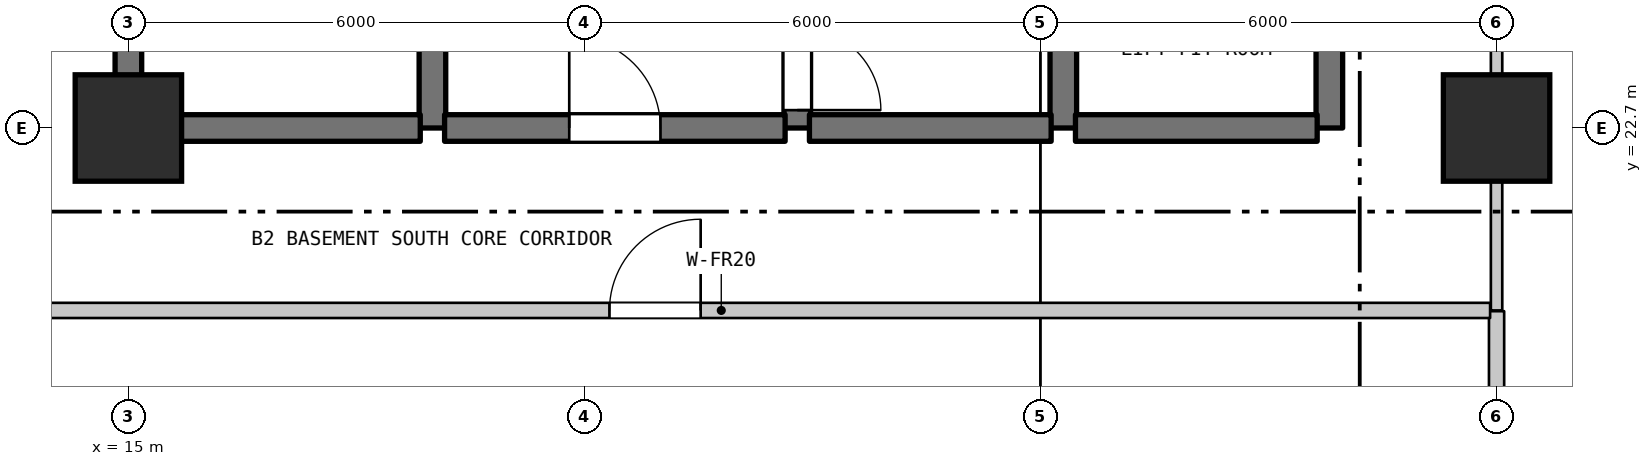
"""IFC4 building model, lengths in metres.
Left out: names, types, materials, properties, quantities, classifications, styles, units other than length and angle.
Written with IfcOpenShell. Run it as: python <this file> out.ifc"""

import sys

from ifc_helpers import new_model, si_unit, direction, frame, frame_2d, origin, origin_2d, place, context, subcontext, project, spatial, rectangle, extrude, element, fill, save


model = new_model("IFC4")
c1 = context("Model", 3, precision=1e-05, world=origin(), true_north=direction((0.0, 1.0)))
c2 = subcontext(c1, "Body", "Model", "MODEL_VIEW")
j1 = project(units=[si_unit("LENGTHUNIT", "METRE"), si_unit("PLANEANGLEUNIT", "RADIAN")], contexts=[c1])
p1 = place(None, origin())
s1 = spatial("IfcSite", under=j1, at=p1, CompositionType="ELEMENT")
p2 = place(p1, origin())
s2 = spatial("IfcBuilding", under=s1, at=p2, CompositionType="ELEMENT")
p3 = place(p2, frame((0.0, 0.0, -9.0)))
s3 = spatial("IfcBuildingStorey", under=s2, at=p3, CompositionType="ELEMENT", Elevation=-9.0)
p4 = place(p3, frame((15.0, 22.7, 0.0), z_axis=(0.0, 0.0, 1.0), x_axis=(1.0, 0.0, 0.0)))
e1 = element("IfcColumn", 1, at=p4, inside=s3, PredefinedType="COLUMN", context=c2, shape_type="SweptSolid", body=[
    extrude(rectangle(XDim=1.4, YDim=1.4, at=origin_2d()), origin(), (0.0, 0.0, 1.0), 4.5),
])
p5 = place(p3, frame((33.0, 22.7, 0.0), z_axis=(0.0, 0.0, 1.0), x_axis=(1.0, 0.0, 0.0)))
e2 = element("IfcColumn", 2, at=p5, inside=s3, PredefinedType="PILASTER", context=c2, shape_type="SweptSolid", body=[
    extrude(rectangle(XDim=1.4, YDim=1.4, at=origin_2d()), origin(), (0.0, 0.0, 1.0), 4.5),
])
p6 = place(p3, frame((15.0, 22.7, 0.0), z_axis=(0.0, 0.0, 1.0), x_axis=(0.0, 1.0, 0.0)))
e3 = element("IfcWall", 3, at=p6, inside=s3, PredefinedType="SHEAR", context=c2, shape_type="SweptSolid", body=[
    extrude(rectangle(XDim=6.8, YDim=0.35, at=frame_2d((3.4, 0.0))), origin(), (0.0, 0.0, 1.0), 4.16),
])
p7 = place(p3, frame((19.0, 22.7, 0.0), z_axis=(0.0, 0.0, 1.0), x_axis=(0.0, 1.0, 0.0)))
e4 = element("IfcWall", 4, at=p7, inside=s3, PredefinedType="SHEAR", context=c2, shape_type="SweptSolid", body=[
    extrude(rectangle(XDim=5.5, YDim=0.35, at=frame_2d((2.75, 0.0))), origin(), (0.0, 0.0, 1.0), 4.16),
])
p8 = place(p7, frame((2.2, 0.0, 0.0)))
e5 = element("IfcOpeningElement", 5, at=p8, cuts=e4, PredefinedType="OPENING", context=c2, shape_type="SweptSolid", body=[
    extrude(rectangle(XDim=1.1, YDim=2.15, at=frame_2d((0.55, 1.075))), frame((0.0, 0.185, 0.0), z_axis=(0.0, -1.0, 0.0), x_axis=(1.0, 0.0, 0.0)), (0.0, 0.0, 1.0), 0.37),
])
p9 = place(p3, frame((23.8, 22.7, 0.0), z_axis=(0.0, 0.0, 1.0), x_axis=(0.0, 1.0, 0.0)))
e6 = element("IfcWall", 6, at=p9, inside=s3, PredefinedType="SHEAR", context=c2, shape_type="SweptSolid", body=[
    extrude(rectangle(XDim=5.5, YDim=0.35, at=frame_2d((2.75, 0.0))), origin(), (0.0, 0.0, 1.0), 4.16),
])
p10 = place(p9, frame((0.235, 0.0, 0.0)))
e7 = element("IfcOpeningElement", 7, at=p10, cuts=e6, PredefinedType="OPENING", context=c2, shape_type="SweptSolid", body=[
    extrude(rectangle(XDim=1.1, YDim=2.15, at=frame_2d((0.55, 1.075))), frame((0.0, 0.185, 0.0), z_axis=(0.0, -1.0, 0.0), x_axis=(1.0, 0.0, 0.0)), (0.0, 0.0, 1.0), 0.37),
])
for number, where, z_axis, x_axis in (
    (8, (27.3, 22.7, 0.0), (0.0, 0.0, 1.0), (0.0, 1.0, 0.0)),
    (9, (30.8, 22.7, 0.0), (0.0, 0.0, 1.0), (0.0, 1.0, 0.0)),
):
    element("IfcWall", number, at=place(p3, frame(where, z_axis=z_axis, x_axis=x_axis)), inside=s3, PredefinedType="SHEAR", context=c2, shape_type="SweptSolid", body=[
        extrude(rectangle(XDim=2.9, YDim=0.35, at=frame_2d((1.45, 0.0))), origin(), (0.0, 0.0, 1.0), 4.16),
    ])
p11 = place(p3, frame((33.0, 0.71, 0.0), z_axis=(0.0, 0.0, 1.0), x_axis=(0.0, 1.0, 0.0)))
e10 = element("IfcWall", 10, at=p11, inside=s3, PredefinedType="STANDARD", context=c2, shape_type="SweptSolid", body=[
    extrude(rectangle(XDim=19.58, YDim=0.2, at=frame_2d((9.79, 0.0))), origin(), (0.0, 0.0, 1.0), 3.61),
])
p12 = place(p3, frame((33.0, 20.3, 0.0), z_axis=(0.0, 0.0, 1.0), x_axis=(0.0, 1.0, 0.0)))
e11 = element("IfcWall", 11, at=p12, inside=s3, PredefinedType="STANDARD", context=c2, shape_type="SweptSolid", body=[
    extrude(rectangle(XDim=2.4, YDim=0.15, at=frame_2d((1.2, 0.0))), origin(), (0.0, 0.0, 1.0), 3.61),
])
p13 = place(p3, frame((12.685, 20.3, 0.0), z_axis=(0.0, 0.0, 1.0), x_axis=(1.0, 0.0, 0.0)))
e12 = element("IfcWall", 12, at=p13, inside=s3, PredefinedType="STANDARD", context=c2, shape_type="SweptSolid", body=[
    extrude(rectangle(XDim=20.23, YDim=0.2, at=frame_2d((10.115, 0.0))), origin(), (0.0, 0.0, 1.0), 4.16),
])
p14 = place(p13, frame((8.644, 0.0, 0.0)))
e13 = element("IfcOpeningElement", 13, at=p14, cuts=e12, PredefinedType="OPENING", context=c2, shape_type="SweptSolid", body=[
    extrude(rectangle(XDim=1.2, YDim=2.2, at=frame_2d((0.6, 1.1))), frame((0.0, 0.11, 0.0), z_axis=(0.0, -1.0, 0.0), x_axis=(1.0, 0.0, 0.0)), (0.0, 0.0, 1.0), 0.22),
])
p15 = place(p3, frame((15.16, 22.7, 0.0), z_axis=(0.0, 0.0, 1.0), x_axis=(1.0, 0.0, 0.0)))
e14 = element("IfcWall", 14, at=p15, inside=s3, PredefinedType="SHEAR", context=c2, shape_type="SweptSolid", body=[
    extrude(rectangle(XDim=3.68, YDim=0.35, at=frame_2d((1.84, 0.0))), origin(), (0.0, 0.0, 1.0), 4.16),
])
p16 = place(p3, frame((19.16, 22.7, 0.0), z_axis=(0.0, 0.0, 1.0), x_axis=(1.0, 0.0, 0.0)))
e15 = element("IfcWall", 15, at=p16, inside=s3, PredefinedType="SHEAR", context=c2, shape_type="SweptSolid", body=[
    extrude(rectangle(XDim=4.48, YDim=0.35, at=frame_2d((2.24, 0.0))), origin(), (0.0, 0.0, 1.0), 4.16),
])
p17 = place(p16, frame((1.64, 0.0, 0.0)))
e16 = element("IfcOpeningElement", 16, at=p17, cuts=e15, PredefinedType="OPENING", context=c2, shape_type="SweptSolid", body=[
    extrude(rectangle(XDim=1.2, YDim=2.2, at=frame_2d((0.6, 1.1))), frame((0.0, 0.185, 0.0), z_axis=(0.0, -1.0, 0.0), x_axis=(1.0, 0.0, 0.0)), (0.0, 0.0, 1.0), 0.37),
])
for number, where, z_axis, x_axis in (
    (17, (23.96, 22.7, 0.0), (0.0, 0.0, 1.0), (1.0, 0.0, 0.0)),
    (18, (27.46, 22.7, 0.0), (0.0, 0.0, 1.0), (1.0, 0.0, 0.0)),
):
    element("IfcWall", number, at=place(p3, frame(where, z_axis=z_axis, x_axis=x_axis)), inside=s3, PredefinedType="SHEAR", context=c2, shape_type="SweptSolid", body=[
        extrude(rectangle(XDim=3.18, YDim=0.35, at=frame_2d((1.59, 0.0))), origin(), (0.0, 0.0, 1.0), 4.16),
    ])
p18 = place(p3, frame((33.0, 22.7, 0.0), z_axis=(0.0, 0.0, 1.0), x_axis=(0.0, 1.0, 0.0)))
e19 = element("IfcWall", 19, at=p18, inside=s3, PredefinedType="STANDARD", context=c2, shape_type="SweptSolid", body=[
    extrude(rectangle(XDim=15.2, YDim=0.15, at=frame_2d((7.6, 0.0))), origin(), (0.0, 0.0, 1.0), 3.56),
])
p19 = place(p18, frame((7.575, 0.0, 0.0)))
e20 = element("IfcOpeningElement", 20, at=p19, cuts=e19, PredefinedType="OPENING", context=c2, shape_type="SweptSolid", body=[
    extrude(rectangle(XDim=1.2, YDim=2.2, at=frame_2d((0.6, 1.1))), frame((0.0, 0.085, 0.0), z_axis=(0.0, -1.0, 0.0), x_axis=(1.0, 0.0, 0.0)), (0.0, 0.0, 1.0), 0.17),
])
p20 = place(p10, frame((1.1, 0.0, 0.0), z_axis=(0.0, 0.0, 1.0), x_axis=(-1.0, 0.0, 0.0)))
e21 = element("IfcDoor", 21, at=p20, inside=s3, OperationType="SINGLE_SWING_LEFT", PredefinedType="DOOR", context=c2, shape_type="SweptSolid", body=[
    extrude(rectangle(XDim=1.1, YDim=2.15, at=frame_2d((0.55, 1.075))), frame((0.0, 0.025, 0.0), z_axis=(0.0, -1.0, 0.0), x_axis=(1.0, 0.0, 0.0)), (0.0, 0.0, 1.0), 0.05),
])
fill(e7, e21)
p21 = place(p14, origin())
e22 = element("IfcDoor", 22, at=p21, inside=s3, OperationType="SINGLE_SWING_RIGHT", PredefinedType="DOOR", context=c2, shape_type="SweptSolid", body=[
    extrude(rectangle(XDim=1.2, YDim=2.2, at=frame_2d((0.6, 1.1))), frame((0.0, 0.025, 0.0), z_axis=(0.0, -1.0, 0.0), x_axis=(1.0, 0.0, 0.0)), (0.0, 0.0, 1.0), 0.05),
])
fill(e13, e22)
p22 = place(p17, origin())
e23 = element("IfcDoor", 23, at=p22, inside=s3, OperationType="SINGLE_SWING_LEFT", PredefinedType="DOOR", context=c2, shape_type="SweptSolid", body=[
    extrude(rectangle(XDim=1.2, YDim=2.2, at=frame_2d((0.6, 1.1))), frame((0.0, 0.025, 0.0), z_axis=(0.0, -1.0, 0.0), x_axis=(1.0, 0.0, 0.0)), (0.0, 0.0, 1.0), 0.05),
])
fill(e16, e23)
save(model, sys.argv[1])
